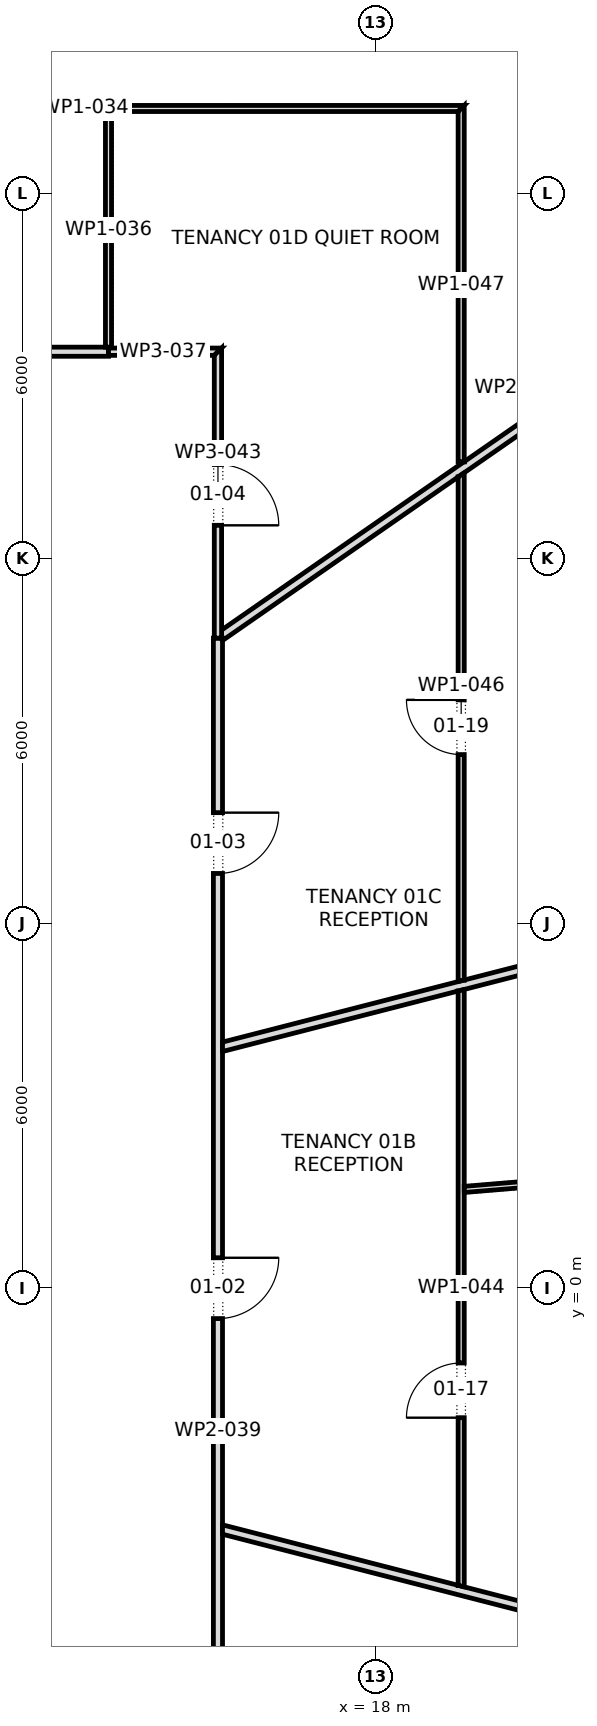
"""IFC4 building model, lengths in metres.
Left out: names, types, materials, properties, quantities, classifications, styles, units other than length and angle.
Written with IfcOpenShell. Run it as: python <this file> out.ifc"""

import sys

from ifc_helpers import new_model, si_unit, direction, frame, frame_2d, origin, place, context, subcontext, project, spatial, polyline, rectangle, outline, extrude, element, fill, save


model = new_model("IFC4")
c1 = context("Model", 3, precision=1e-05, world=origin(), true_north=direction((0.0, 1.0)))
c2 = subcontext(c1, "Body", "Model", "MODEL_VIEW")
j1 = project(units=[si_unit("LENGTHUNIT", "METRE"), si_unit("PLANEANGLEUNIT", "RADIAN")], contexts=[c1])
p1 = place(None, origin())
s1 = spatial("IfcSite", under=j1, at=p1, CompositionType="ELEMENT")
p2 = place(p1, origin())
s2 = spatial("IfcBuilding", under=s1, at=p2, CompositionType="ELEMENT")
p3 = place(p2, frame((0.0, 0.0, 31.9)))
s3 = spatial("IfcBuildingStorey", under=s2, at=p3, CompositionType="ELEMENT", Elevation=31.9)
p4 = place(p3, frame((-9.73, 15.4, 0.0), z_axis=(0.0, 0.0, 1.0), x_axis=(1.0, 0.0, 0.0)))
e1 = element("IfcWall", 1, at=p4, inside=s3, PredefinedType="PARTITIONING", context=c2, shape_type="SweptSolid", body=[
    extrude(rectangle(XDim=23.33, YDim=0.15, at=frame_2d((11.665, 0.0))), origin(), (0.0, 0.0, 1.0), 3.9),
])
p5 = place(p4, frame((18.79, 0.0, 0.0)))
e2 = element("IfcOpeningElement", 2, at=p5, cuts=e1, PredefinedType="OPENING", context=c2, shape_type="SweptSolid", body=[
    extrude(rectangle(XDim=1.0, YDim=2.1, at=frame_2d((0.5, 1.05))), frame((0.0, 0.087, 0.0), z_axis=(0.0, -1.0, 0.0), x_axis=(1.0, 0.0, 0.0)), (0.0, 0.0, 1.0), 0.174),
])
p6 = place(p4, frame((10.175, 0.0, 0.0)))
e3 = element("IfcOpeningElement", 3, at=p6, cuts=e1, PredefinedType="OPENING", context=c2, shape_type="SweptSolid", body=[
    extrude(rectangle(XDim=1.0, YDim=2.1, at=frame_2d((0.5, 1.05))), frame((0.0, 0.087, 0.0), z_axis=(0.0, -1.0, 0.0), x_axis=(1.0, 0.0, 0.0)), (0.0, 0.0, 1.0), 0.174),
])
p7 = place(p4, frame((2.55, 0.0, 0.0)))
e4 = element("IfcOpeningElement", 4, at=p7, cuts=e1, PredefinedType="OPENING", context=c2, shape_type="SweptSolid", body=[
    extrude(rectangle(XDim=1.0, YDim=2.1, at=frame_2d((0.5, 1.05))), frame((0.0, 0.087, 0.0), z_axis=(0.0, -1.0, 0.0), x_axis=(1.0, 0.0, 0.0)), (0.0, 0.0, 1.0), 0.174),
])
p8 = place(p3, frame((7.018, 19.4, 0.0), z_axis=(0.0, 0.0, 1.0), x_axis=(1.0, 0.0, 0.0)))
e5 = element("IfcWall", 5, at=p8, inside=s3, PredefinedType="PARTITIONING", context=c2, shape_type="SweptSolid", body=[
    extrude(outline(polyline([(0.0, -0.05), (1.633, -0.05), (3.266, -0.05), (4.899, -0.05), (6.532, -0.05), (6.532, -0.05), (6.632, -0.05), (6.632, -0.05), (8.532, -0.05), (10.432, -0.05), (12.332, -0.05), (12.332, -0.05), (12.432, 0.05), (10.661, 0.05), (8.89, 0.05), (7.119, 0.05), (5.348, 0.05), (3.577, 0.05), (1.807, 0.05), (0.036, 0.05), (0.0, -0.049), (0.0, -0.05)])), origin(), (0.0, 0.0, 1.0), 3.9),
])
p9 = place(p8, frame((2.812, 0.0, 0.0)))
e6 = element("IfcOpeningElement", 6, at=p9, cuts=e5, PredefinedType="OPENING", context=c2, shape_type="SweptSolid", body=[
    extrude(rectangle(XDim=0.9, YDim=2.1, at=frame_2d((0.45, 1.05))), frame((0.0, 0.062, 0.0), z_axis=(0.0, -1.0, 0.0), x_axis=(1.0, 0.0, 0.0)), (0.0, 0.0, 1.0), 0.124),
])
p10 = place(p3, frame((13.6, 15.46, 0.0), z_axis=(0.0, 0.0, 1.0), x_axis=(0.0, 1.0, 0.0)))
e7 = element("IfcWall", 7, at=p10, inside=s3, PredefinedType="PARTITIONING", context=c2, shape_type="SweptSolid", body=[
    extrude(outline(polyline([(0.0, -0.05), (1.945, -0.05), (3.89, -0.05), (3.89, 0.05), (1.952, 0.05), (0.015, 0.05), (0.015, 0.0), (0.0, 0.0), (0.0, -0.05)])), origin(), (0.0, 0.0, 1.0), 3.9),
])
p11 = place(p3, frame((13.6, 15.4, 0.0), z_axis=(0.0, 0.0, 1.0), x_axis=(1.0, 0.0, 0.0)))
e8 = element("IfcWall", 8, at=p11, inside=s3, PredefinedType="PARTITIONING", context=c2, shape_type="SweptSolid", body=[
    extrude(outline(polyline([(0.0, -0.06), (1.74, -0.06), (1.86, 0.06), (0.0, 0.06), (0.0, -0.06)])), origin(), (0.0, 0.0, 1.0), 3.9),
])
p12 = place(p3, frame((15.4, -15.475, 0.0), z_axis=(0.0, 0.0, 1.0), x_axis=(0.0, 1.0, 0.0)))
e9 = element("IfcWall", 9, at=p12, inside=s3, PredefinedType="PARTITIONING", context=c2, shape_type="SweptSolid", body=[
    extrude(outline(polyline([(26.165, 0.075), (24.307, 0.075), (22.449, 0.075), (20.59, 0.075), (18.732, 0.075), (16.874, 0.075), (15.016, 0.075), (13.158, 0.075), (11.299, 0.075), (9.441, 0.075), (7.583, 0.075), (5.725, 0.075), (3.866, 0.075), (2.008, 0.075), (0.15, 0.075), (0.0, -0.075), (1.869, -0.075), (3.738, -0.075), (5.607, -0.075), (7.476, -0.075), (9.345, -0.075), (11.214, -0.075), (13.083, -0.075), (14.952, -0.075), (16.821, -0.075), (18.689, -0.075), (20.558, -0.075), (22.427, -0.075), (24.296, -0.075), (26.165, -0.075), (26.165, 0.075)])), origin(), (0.0, 0.0, 1.0), 3.9),
])
p13 = place(p12, frame((4.9, 0.0, 0.0)))
e10 = element("IfcOpeningElement", 10, at=p13, cuts=e9, PredefinedType="OPENING", context=c2, shape_type="SweptSolid", body=[
    extrude(rectangle(XDim=1.8, YDim=2.1, at=frame_2d((0.9, 1.05))), frame((0.0, 0.087, 0.0), z_axis=(0.0, -1.0, 0.0), x_axis=(1.0, 0.0, 0.0)), (0.0, 0.0, 1.0), 0.174),
])
p14 = place(p12, frame((14.975, 0.0, 0.0)))
e11 = element("IfcOpeningElement", 11, at=p14, cuts=e9, PredefinedType="OPENING", context=c2, shape_type="SweptSolid", body=[
    extrude(rectangle(XDim=1.0, YDim=2.1, at=frame_2d((0.5, 1.05))), frame((0.0, 0.087, 0.0), z_axis=(0.0, -1.0, 0.0), x_axis=(1.0, 0.0, 0.0)), (0.0, 0.0, 1.0), 0.174),
])
p15 = place(p12, frame((22.295, 0.0, 0.0)))
e12 = element("IfcOpeningElement", 12, at=p15, cuts=e9, PredefinedType="OPENING", context=c2, shape_type="SweptSolid", body=[
    extrude(rectangle(XDim=1.0, YDim=2.1, at=frame_2d((0.5, 1.05))), frame((0.0, 0.087, 0.0), z_axis=(0.0, -1.0, 0.0), x_axis=(1.0, 0.0, 0.0)), (0.0, 0.0, 1.0), 0.174),
])
p16 = place(p3, frame((15.457, -3.965, 0.0), z_axis=(0.0, 0.0, 1.0), x_axis=(0.968588981289, -0.248667218036, 0.0)))
e13 = element("IfcWall", 13, at=p16, inside=s3, PredefinedType="PARTITIONING", context=c2, shape_type="SweptSolid", body=[
    extrude(outline(polyline([(0.038, -0.075), (1.915, -0.075), (3.791, -0.075), (5.667, -0.075), (7.544, -0.075), (9.42, -0.075), (11.297, -0.075), (13.173, -0.075), (15.049, -0.075), (16.926, -0.075), (18.802, -0.075), (18.816, -0.008), (18.816, 0.075), (16.965, 0.075), (15.113, 0.075), (13.261, 0.075), (11.41, 0.075), (9.558, 0.075), (7.707, 0.075), (5.855, 0.075), (4.003, 0.075), (4.0, 0.074), (4.0, 0.075), (2.667, 0.075), (1.333, 0.075), (0.0, 0.075), (0.0, 0.073), (0.038, -0.075)])), origin(), (0.0, 0.0, 1.0), 2.892),
])
p17 = place(p3, frame((15.457, 3.965, 0.0), z_axis=(0.0, 0.0, 1.0), x_axis=(0.968588981289, 0.248667218036, 0.0)))
e14 = element("IfcWall", 14, at=p17, inside=s3, PredefinedType="PARTITIONING", context=c2, shape_type="SweptSolid", body=[
    extrude(outline(polyline([(0.0, -0.075), (1.333, -0.075), (2.667, -0.075), (4.0, -0.075), (4.0, -0.074), (4.003, -0.075), (5.855, -0.075), (7.707, -0.075), (9.558, -0.075), (11.41, -0.075), (13.261, -0.075), (15.113, -0.075), (16.965, -0.075), (18.816, -0.075), (18.816, 0.008), (18.802, 0.075), (16.97, 0.075), (15.137, 0.075), (13.305, 0.075), (11.472, 0.075), (9.64, 0.075), (7.807, 0.075), (5.975, 0.075), (4.142, 0.075), (4.141, 0.073), (4.133, 0.075), (2.768, 0.075), (1.403, 0.075), (0.038, 0.075), (0.0, -0.073), (0.0, -0.075)])), origin(), (0.0, 0.0, 1.0), 2.892),
])
p18 = place(p3, frame((15.433, 10.712, 0.0), z_axis=(0.0, 0.0, 1.0), x_axis=(0.82152236589, 0.570176290583, 0.0)))
e15 = element("IfcWall", 15, at=p18, inside=s3, PredefinedType="PARTITIONING", context=c2, shape_type="SweptSolid", body=[
    extrude(outline(polyline([(0.0, -0.075), (1.572, -0.075), (3.144, -0.075), (4.716, -0.075), (4.718, -0.073), (4.721, -0.075), (6.645, -0.075), (8.569, -0.075), (10.493, -0.075), (12.417, -0.075), (14.341, -0.075), (14.341, -0.074), (14.336, 0.0), (14.316, 0.075), (12.441, 0.075), (10.567, 0.075), (8.692, 0.075), (6.817, 0.075), (4.942, 0.075), (4.941, 0.073), (4.939, 0.075), (3.321, 0.075), (1.703, 0.075), (0.085, 0.075), (0.01, -0.034), (0.022, -0.042), (0.0, -0.074), (0.0, -0.075)])), origin(), (0.0, 0.0, 1.0), 2.91),
])
p19 = place(p3, frame((15.4, 15.46, 0.0), z_axis=(0.0, 0.0, 1.0), x_axis=(0.0, -1.0, 0.0)))
e16 = element("IfcWall", 16, at=p19, inside=s3, PredefinedType="PARTITIONING", context=c2, shape_type="SweptSolid", body=[
    extrude(outline(polyline([(4.77, 0.06), (3.18, 0.06), (1.59, 0.06), (0.0, 0.06), (0.12, -0.06), (1.67, -0.06), (3.22, -0.06), (4.77, -0.06), (4.77, 0.06)])), origin(), (0.0, 0.0, 1.0), 3.9),
])
p20 = place(p19, frame((1.915, 0.0, 0.0)))
e17 = element("IfcOpeningElement", 17, at=p20, cuts=e16, PredefinedType="OPENING", context=c2, shape_type="SweptSolid", body=[
    extrude(rectangle(XDim=1.0, YDim=2.1, at=frame_2d((0.5, 1.05))), frame((0.0, 0.072, 0.0), z_axis=(0.0, -1.0, 0.0), x_axis=(1.0, 0.0, 0.0)), (0.0, 0.0, 1.0), 0.144),
])
p21 = place(p3, frame((19.4, -4.912, 0.0), z_axis=(0.0, 0.0, 1.0), x_axis=(0.0, 1.0, 0.0)))
e18 = element("IfcWall", 18, at=p21, inside=s3, PredefinedType="PARTITIONING", context=c2, shape_type="SweptSolid", body=[
    extrude(outline(polyline([(9.824, -0.05), (9.824, -0.049), (9.799, 0.05), (7.844, 0.05), (5.889, 0.05), (3.935, 0.05), (1.98, 0.05), (0.026, 0.05), (0.0, -0.049), (0.0, -0.05), (1.965, -0.05), (3.93, -0.05), (5.895, -0.05), (7.859, -0.05), (9.824, -0.05)])), origin(), (0.0, 0.0, 1.0), 3.9),
])
p22 = place(p21, frame((2.782, 0.0, 0.0)))
e19 = element("IfcOpeningElement", 19, at=p22, cuts=e18, PredefinedType="OPENING", context=c2, shape_type="SweptSolid", body=[
    extrude(rectangle(XDim=0.9, YDim=2.1, at=frame_2d((0.45, 1.05))), frame((0.0, 0.062, 0.0), z_axis=(0.0, -1.0, 0.0), x_axis=(1.0, 0.0, 0.0)), (0.0, 0.0, 1.0), 0.124),
])
p23 = place(p3, frame((19.446, 1.624, 0.0), z_axis=(0.0, 0.0, 1.0), x_axis=(0.996584208703, 0.082582776438, 0.0)))
e20 = element("IfcWall", 20, at=p23, inside=s3, PredefinedType="PARTITIONING", context=c2, shape_type="SweptSolid", body=[
    extrude(outline(polyline([(15.633, -0.05), (15.633, 0.035), (15.631, 0.05), (13.678, 0.05), (11.725, 0.05), (9.772, 0.05), (7.819, 0.05), (5.866, 0.05), (3.914, 0.05), (1.961, 0.05), (0.008, 0.05), (0.0, -0.045), (0.0, -0.05), (1.954, -0.05), (3.908, -0.05), (5.862, -0.05), (7.816, -0.05), (9.771, -0.05), (11.725, -0.05), (13.679, -0.05), (15.633, -0.05)])), origin(), (0.0, 0.0, 1.0), 2.892),
])
p24 = place(p23, frame((7.496, 0.0, 0.0)))
e21 = element("IfcOpeningElement", 21, at=p24, cuts=e20, PredefinedType="OPENING", context=c2, shape_type="SweptSolid", body=[
    extrude(rectangle(XDim=0.9, YDim=2.1, at=frame_2d((0.45, 1.05))), frame((0.0, 0.062, 0.0), z_axis=(0.0, -1.0, 0.0), x_axis=(1.0, 0.0, 0.0)), (0.0, 0.0, 1.0), 0.124),
])
p25 = place(p3, frame((19.4, 13.409, 0.0), z_axis=(0.0, 0.0, 1.0), x_axis=(0.0, -1.0, 0.0)))
e22 = element("IfcWall", 22, at=p25, inside=s3, PredefinedType="PARTITIONING", context=c2, shape_type="SweptSolid", body=[
    extrude(outline(polyline([(8.367, -0.05), (8.367, -0.048), (8.342, 0.05), (6.673, 0.05), (5.005, 0.05), (3.337, 0.05), (1.668, 0.05), (0.0, 0.05), (0.0, 0.049), (0.069, -0.05), (1.729, -0.05), (3.388, -0.05), (5.048, -0.05), (6.707, -0.05), (8.367, -0.05)])), origin(), (0.0, 0.0, 1.0), 3.9),
])
p26 = place(p25, frame((3.734, 0.0, 0.0)))
e23 = element("IfcOpeningElement", 23, at=p26, cuts=e22, PredefinedType="OPENING", context=c2, shape_type="SweptSolid", body=[
    extrude(rectangle(XDim=0.9, YDim=2.1, at=frame_2d((0.45, 1.05))), frame((0.0, 0.062, 0.0), z_axis=(0.0, -1.0, 0.0), x_axis=(1.0, 0.0, 0.0)), (0.0, 0.0, 1.0), 0.124),
])
p27 = place(p3, frame((19.4, 19.45, 0.0), z_axis=(0.0, 0.0, 1.0), x_axis=(0.0, -1.0, 0.0)))
e24 = element("IfcWall", 24, at=p27, inside=s3, PredefinedType="PARTITIONING", context=c2, shape_type="SweptSolid", body=[
    extrude(outline(polyline([(5.86, 0.05), (3.906, 0.05), (1.953, 0.05), (0.0, 0.05), (0.1, -0.05), (2.02, -0.05), (3.94, -0.05), (5.86, -0.05), (5.86, 0.05)])), origin(), (0.0, 0.0, 1.0), 3.9),
])
p28 = place(p14, frame((1.0, 0.0, 0.0), z_axis=(0.0, 0.0, 1.0), x_axis=(-1.0, 0.0, 0.0)))
e25 = element("IfcDoor", 25, at=p28, inside=s3, OperationType="SINGLE_SWING_RIGHT", PredefinedType="DOOR", context=c2, shape_type="SweptSolid", body=[
    extrude(rectangle(XDim=1.0, YDim=2.1, at=frame_2d((0.5, 1.05))), frame((0.0, 0.025, 0.0), z_axis=(0.0, -1.0, 0.0), x_axis=(1.0, 0.0, 0.0)), (0.0, 0.0, 1.0), 0.05),
])
fill(e11, e25)
p29 = place(p15, frame((1.0, 0.0, 0.0), z_axis=(0.0, 0.0, 1.0), x_axis=(-1.0, 0.0, 0.0)))
e26 = element("IfcDoor", 26, at=p29, inside=s3, OperationType="SINGLE_SWING_RIGHT", PredefinedType="DOOR", context=c2, shape_type="SweptSolid", body=[
    extrude(rectangle(XDim=1.0, YDim=2.1, at=frame_2d((0.5, 1.05))), frame((0.0, 0.025, 0.0), z_axis=(0.0, -1.0, 0.0), x_axis=(1.0, 0.0, 0.0)), (0.0, 0.0, 1.0), 0.05),
])
fill(e12, e26)
p30 = place(p20, origin())
e27 = element("IfcDoor", 27, at=p30, inside=s3, OperationType="SINGLE_SWING_LEFT", PredefinedType="DOOR", context=c2, shape_type="SweptSolid", body=[
    extrude(rectangle(XDim=1.0, YDim=2.1, at=frame_2d((0.5, 1.05))), frame((0.0, 0.025, 0.0), z_axis=(0.0, -1.0, 0.0), x_axis=(1.0, 0.0, 0.0)), (0.0, 0.0, 1.0), 0.05),
])
fill(e17, e27)
p31 = place(p22, origin())
e28 = element("IfcDoor", 28, at=p31, inside=s3, OperationType="SINGLE_SWING_RIGHT", PredefinedType="DOOR", context=c2, shape_type="SweptSolid", body=[
    extrude(rectangle(XDim=0.9, YDim=2.1, at=frame_2d((0.45, 1.05))), frame((0.0, 0.025, 0.0), z_axis=(0.0, -1.0, 0.0), x_axis=(1.0, 0.0, 0.0)), (0.0, 0.0, 1.0), 0.05),
])
fill(e19, e28)
p32 = place(p26, frame((0.9, 0.0, 0.0), z_axis=(0.0, 0.0, 1.0), x_axis=(-1.0, 0.0, 0.0)))
e29 = element("IfcDoor", 29, at=p32, inside=s3, OperationType="SINGLE_SWING_LEFT", PredefinedType="DOOR", context=c2, shape_type="SweptSolid", body=[
    extrude(rectangle(XDim=0.9, YDim=2.1, at=frame_2d((0.45, 1.05))), frame((0.0, 0.025, 0.0), z_axis=(0.0, -1.0, 0.0), x_axis=(1.0, 0.0, 0.0)), (0.0, 0.0, 1.0), 0.05),
])
fill(e23, e29)
save(model, sys.argv[1])
